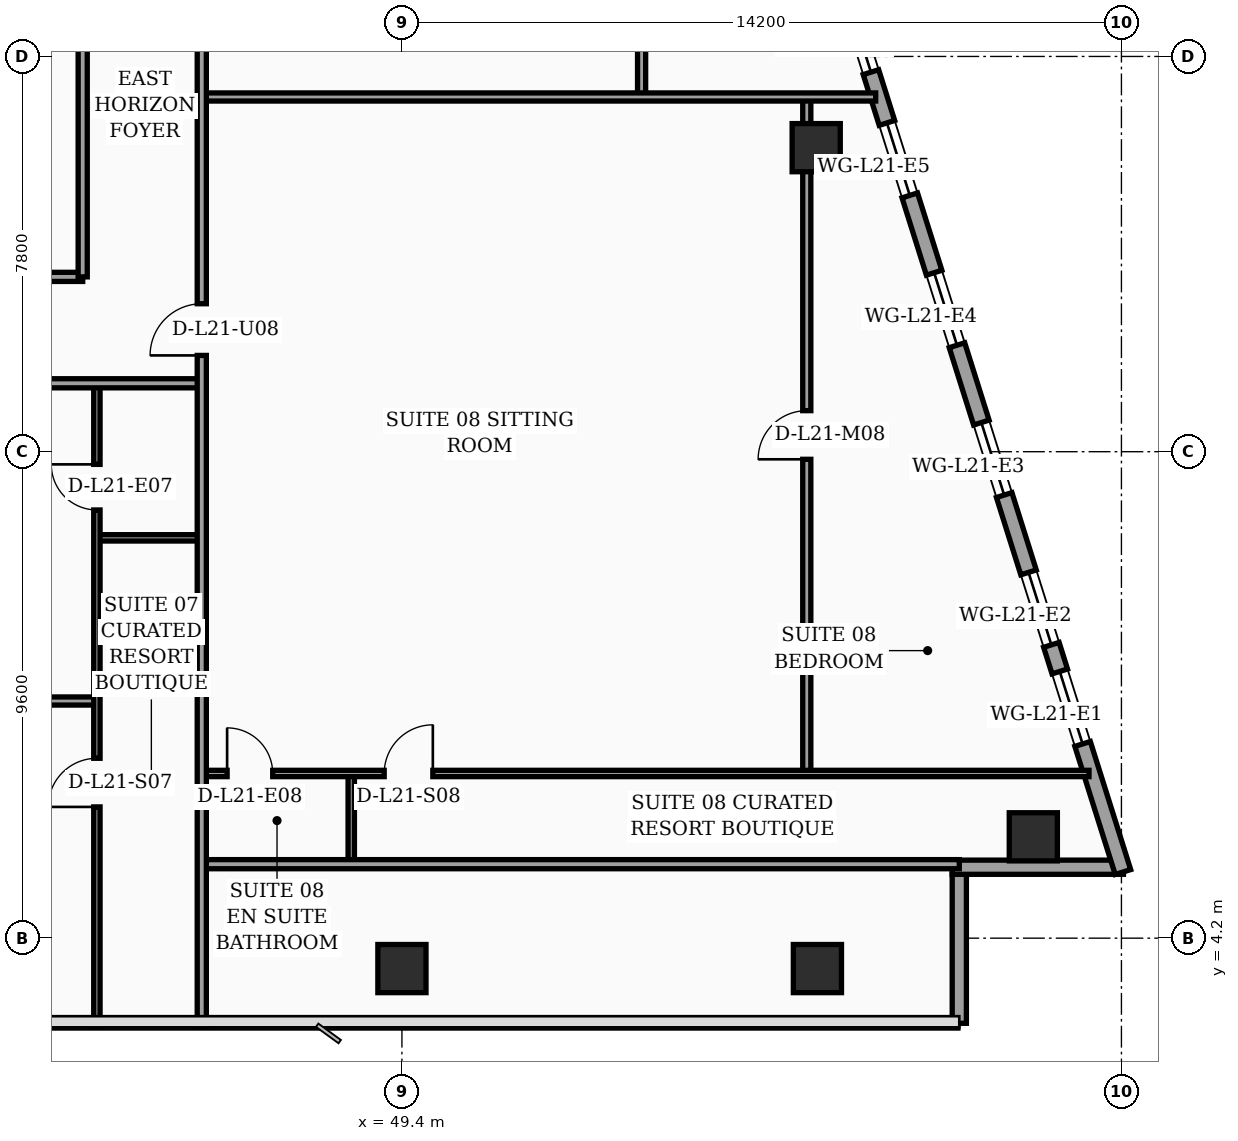
"""IFC4 building model, lengths in metres.
Left out: names, types, materials, properties, quantities, classifications, styles, units other than length and angle.
Written with IfcOpenShell. Run it as: python <this file> out.ifc"""

import sys

from ifc_helpers import new_model, si_unit, direction, frame, frame_2d, origin, origin_2d, place, context, subcontext, project, spatial, rectangle, hollow_rectangle, extrude, element, fill, save


model = new_model("IFC4")
c1 = context("Model", 3, precision=1e-05, world=origin(), true_north=direction((0.0, 1.0)))
c2 = subcontext(c1, "Body", "Model", "MODEL_VIEW")
j1 = project(units=[si_unit("LENGTHUNIT", "METRE"), si_unit("PLANEANGLEUNIT", "RADIAN")], contexts=[c1])
p1 = place(None, origin())
s1 = spatial("IfcSite", under=j1, at=p1, CompositionType="ELEMENT")
p2 = place(p1, origin())
s2 = spatial("IfcBuilding", under=s1, at=p2, CompositionType="ELEMENT")
p3 = place(p2, frame((0.0, 0.0, 88.8)))
s3 = spatial("IfcBuildingStorey", under=s2, at=p3, CompositionType="ELEMENT", Elevation=88.8)
for number, where, z_axis, x_axis in (
    (1, (49.4, 3.6, 0.0), (0.0, 0.0, 1.0), (1.0, 0.0, 0.0)),
    (2, (57.6, 3.6, 0.0), (0.0, 0.0, 1.0), (1.0, 0.0, 0.0)),
    (3, (61.861, 6.2, 0.0), (0.0, 0.0, 1.0), (1.0, 0.0, 0.0)),
    (4, (57.576, 19.8, 0.0), (0.0, 0.0, 1.0), (1.0, 0.0, 0.0)),
):
    element("IfcColumn", number, at=place(p3, frame(where, z_axis=z_axis, x_axis=x_axis)), inside=s3, PredefinedType="COLUMN", context=c2, shape_type="SweptSolid", body=[
        extrude(hollow_rectangle(XDim=0.95, YDim=0.95, WallThickness=0.04, at=origin_2d()), origin(), (0.0, 0.0, 1.0), 3.52),
    ])
p4 = place(p3, frame((60.4, 2.52, 0.0), z_axis=(0.0, 0.0, 1.0), x_axis=(0.0, 1.0, 0.0)))
e5 = element("IfcWall", 5, at=p4, inside=s3, PredefinedType="SOLIDWALL", context=c2, shape_type="SweptSolid", body=[
    extrude(rectangle(XDim=2.94, YDim=0.28, at=frame_2d((1.47, 0.0))), origin(), (0.0, 0.0, 1.0), 3.02),
])
p5 = place(p3, frame((60.26, 5.6, 0.0), z_axis=(0.0, 0.0, 1.0), x_axis=(1.0, 0.0, 0.0)))
e6 = element("IfcWall", 6, at=p5, inside=s3, PredefinedType="SOLIDWALL", context=c2, shape_type="SweptSolid", body=[
    extrude(rectangle(XDim=3.38, YDim=0.28, at=frame_2d((1.69, 0.0))), origin(), (0.0, 0.0, 1.0), 3.02),
])
p6 = place(p3, frame((63.63, 5.505, 0.0), z_axis=(0.0, 0.0, 1.0), x_axis=(-0.300501856448, 0.953781229775, 0.0)))
e7 = element("IfcWall", 7, at=p6, inside=s3, PredefinedType="SOLIDWALL", context=c2, shape_type="SweptSolid", body=[
    extrude(rectangle(XDim=30.814, YDim=0.32, at=frame_2d((15.407, 0.0))), origin(), (0.0, 0.0, 1.0), 3.52),
])
p7 = place(p6, frame((18.796, 0.0, 0.0)))
e8 = element("IfcOpeningElement", 8, at=p7, cuts=e7, PredefinedType="OPENING", context=c2, shape_type="SweptSolid", body=[
    extrude(rectangle(XDim=1.4, YDim=2.25, at=frame_2d((0.7, 1.125))), frame((0.0, 0.17, 0.0), z_axis=(0.0, -1.0, 0.0), x_axis=(1.0, 0.0, 0.0)), (0.0, 0.0, 1.0), 0.34),
])
p8 = place(p6, frame((2.65, 0.0, 0.75)))
e9 = element("IfcOpeningElement", 9, at=p8, cuts=e7, PredefinedType="OPENING", context=c2, shape_type="SweptSolid", body=[
    extrude(rectangle(XDim=1.5, YDim=1.6, at=frame_2d((0.75, 0.8))), frame((0.0, 0.17, 0.0), z_axis=(0.0, -1.0, 0.0), x_axis=(1.0, 0.0, 0.0)), (0.0, 0.0, 1.0), 0.34),
])
p9 = place(p6, frame((4.7, 0.0, 0.75)))
e10 = element("IfcOpeningElement", 10, at=p9, cuts=e7, PredefinedType="OPENING", context=c2, shape_type="SweptSolid", body=[
    extrude(rectangle(XDim=1.5, YDim=1.6, at=frame_2d((0.75, 0.8))), frame((0.0, 0.17, 0.0), z_axis=(0.0, -1.0, 0.0), x_axis=(1.0, 0.0, 0.0)), (0.0, 0.0, 1.0), 0.34),
])
p10 = place(p6, frame((7.8, 0.0, 0.75)))
e11 = element("IfcOpeningElement", 11, at=p10, cuts=e7, PredefinedType="OPENING", context=c2, shape_type="SweptSolid", body=[
    extrude(rectangle(XDim=1.5, YDim=1.6, at=frame_2d((0.75, 0.8))), frame((0.0, 0.17, 0.0), z_axis=(0.0, -1.0, 0.0), x_axis=(1.0, 0.0, 0.0)), (0.0, 0.0, 1.0), 0.34),
])
p11 = place(p6, frame((10.9, 0.0, 0.75)))
e12 = element("IfcOpeningElement", 12, at=p11, cuts=e7, PredefinedType="OPENING", context=c2, shape_type="SweptSolid", body=[
    extrude(rectangle(XDim=1.5, YDim=1.6, at=frame_2d((0.75, 0.8))), frame((0.0, 0.17, 0.0), z_axis=(0.0, -1.0, 0.0), x_axis=(1.0, 0.0, 0.0)), (0.0, 0.0, 1.0), 0.34),
])
p12 = place(p6, frame((14.0, 0.0, 0.75)))
e13 = element("IfcOpeningElement", 13, at=p12, cuts=e7, PredefinedType="OPENING", context=c2, shape_type="SweptSolid", body=[
    extrude(rectangle(XDim=1.5, YDim=1.6, at=frame_2d((0.75, 0.8))), frame((0.0, 0.17, 0.0), z_axis=(0.0, -1.0, 0.0), x_axis=(1.0, 0.0, 0.0)), (0.0, 0.0, 1.0), 0.34),
])
p13 = place(p6, frame((16.55, 0.0, 0.75)))
e14 = element("IfcOpeningElement", 14, at=p13, cuts=e7, PredefinedType="OPENING", context=c2, shape_type="SweptSolid", body=[
    extrude(rectangle(XDim=1.5, YDim=1.6, at=frame_2d((0.75, 0.8))), frame((0.0, 0.17, 0.0), z_axis=(0.0, -1.0, 0.0), x_axis=(1.0, 0.0, 0.0)), (0.0, 0.0, 1.0), 0.34),
])
p14 = place(p6, frame((20.75, 0.0, 0.75)))
e15 = element("IfcOpeningElement", 15, at=p14, cuts=e7, PredefinedType="OPENING", context=c2, shape_type="SweptSolid", body=[
    extrude(rectangle(XDim=1.5, YDim=1.6, at=frame_2d((0.75, 0.8))), frame((0.0, 0.17, 0.0), z_axis=(0.0, -1.0, 0.0), x_axis=(1.0, 0.0, 0.0)), (0.0, 0.0, 1.0), 0.34),
])
p15 = place(p6, frame((26.4, 0.0, 0.75)))
e16 = element("IfcOpeningElement", 16, at=p15, cuts=e7, PredefinedType="OPENING", context=c2, shape_type="SweptSolid", body=[
    extrude(rectangle(XDim=1.5, YDim=1.6, at=frame_2d((0.75, 0.8))), frame((0.0, 0.17, 0.0), z_axis=(0.0, -1.0, 0.0), x_axis=(1.0, 0.0, 0.0)), (0.0, 0.0, 1.0), 0.34),
])
p16 = place(p3, frame((43.38, 12.1, 0.0), z_axis=(0.0, 0.0, 1.0), x_axis=(1.0, 0.0, 0.0)))
e17 = element("IfcWall", 17, at=p16, inside=s3, PredefinedType="PARTITIONING", context=c2, shape_type="SweptSolid", body=[
    extrude(rectangle(XDim=2.07, YDim=0.125, at=frame_2d((1.035, 0.0))), origin(), (0.0, 0.0, 1.0), 3.52),
])
p17 = place(p3, frame((38.17, 8.88, 0.0), z_axis=(0.0, 0.0, 1.0), x_axis=(1.0, 0.0, 0.0)))
e18 = element("IfcWall", 18, at=p17, inside=s3, PredefinedType="PARTITIONING", context=c2, shape_type="SweptSolid", body=[
    extrude(rectangle(XDim=5.21, YDim=0.16, at=frame_2d((2.605, 0.0))), origin(), (0.0, 0.0, 1.0), 3.52),
])
p18 = place(p17, frame((2.13, 0.0, 0.0)))
e19 = element("IfcOpeningElement", 19, at=p18, cuts=e18, PredefinedType="OPENING", context=c2, shape_type="SweptSolid", body=[
    extrude(rectangle(XDim=0.96, YDim=2.2, at=frame_2d((0.48, 1.1))), frame((0.0, 0.09, 0.0), z_axis=(0.0, -1.0, 0.0), x_axis=(1.0, 0.0, 0.0)), (0.0, 0.0, 1.0), 0.18),
])
p19 = place(p3, frame((43.38, 2.44, 0.0), z_axis=(0.0, 0.0, 1.0), x_axis=(0.0, 1.0, 0.0)))
e20 = element("IfcWall", 20, at=p19, inside=s3, PredefinedType="PARTITIONING", context=c2, shape_type="SweptSolid", body=[
    extrude(rectangle(XDim=12.71, YDim=0.125, at=frame_2d((6.355, 0.0))), origin(), (0.0, 0.0, 1.0), 3.02),
])
p20 = place(p19, frame((4.35, 0.0, 0.0)))
e21 = element("IfcOpeningElement", 21, at=p20, cuts=e20, PredefinedType="OPENING", context=c2, shape_type="SweptSolid", body=[
    extrude(rectangle(XDim=0.96, YDim=2.2, at=frame_2d((0.48, 1.1))), frame((0.0, 0.073, 0.0), z_axis=(0.0, -1.0, 0.0), x_axis=(1.0, 0.0, 0.0)), (0.0, 0.0, 1.0), 0.145),
])
p21 = place(p19, frame((10.21, 0.0, 0.0)))
e22 = element("IfcOpeningElement", 22, at=p21, cuts=e20, PredefinedType="OPENING", context=c2, shape_type="SweptSolid", body=[
    extrude(rectangle(XDim=0.9, YDim=2.15, at=frame_2d((0.45, 1.075))), frame((0.0, 0.073, 0.0), z_axis=(0.0, -1.0, 0.0), x_axis=(1.0, 0.0, 0.0)), (0.0, 0.0, 1.0), 0.145),
])
p22 = place(p3, frame((32.4, 15.15, 0.0), z_axis=(0.0, 0.0, 1.0), x_axis=(1.0, 0.0, 0.0)))
e23 = element("IfcWall", 23, at=p22, inside=s3, PredefinedType="PARTITIONING", context=c2, shape_type="SweptSolid", body=[
    extrude(rectangle(XDim=13.05, YDim=0.18, at=frame_2d((6.525, 0.0))), origin(), (0.0, 0.0, 1.0), 2.82),
])
p23 = place(p22, frame((1.51, 0.0, 0.0)))
e24 = element("IfcOpeningElement", 24, at=p23, cuts=e23, PredefinedType="OPENING", context=c2, shape_type="SweptSolid", body=[
    extrude(rectangle(XDim=1.02, YDim=2.2, at=frame_2d((0.51, 1.1))), frame((0.0, 0.1, 0.0), z_axis=(0.0, -1.0, 0.0), x_axis=(1.0, 0.0, 0.0)), (0.0, 0.0, 1.0), 0.2),
])
p24 = place(p22, frame((7.87, 0.0, 0.0)))
e25 = element("IfcOpeningElement", 25, at=p24, cuts=e23, PredefinedType="OPENING", context=c2, shape_type="SweptSolid", body=[
    extrude(rectangle(XDim=1.02, YDim=2.2, at=frame_2d((0.51, 1.1))), frame((0.0, 0.1, 0.0), z_axis=(0.0, -1.0, 0.0), x_axis=(1.0, 0.0, 0.0)), (0.0, 0.0, 1.0), 0.2),
])
p25 = place(p3, frame((21.5, 17.25, 0.0), z_axis=(0.0, 0.0, 1.0), x_axis=(1.0, 0.0, 0.0)))
e26 = element("IfcWall", 26, at=p25, inside=s3, PredefinedType="PARTITIONING", context=c2, shape_type="SweptSolid", body=[
    extrude(rectangle(XDim=21.6, YDim=0.18, at=frame_2d((10.8, 0.0))), origin(), (0.0, 0.0, 1.0), 2.82),
])
p26 = place(p25, frame((0.95, 0.0, 0.0)))
e27 = element("IfcOpeningElement", 27, at=p26, cuts=e26, PredefinedType="OPENING", context=c2, shape_type="SweptSolid", body=[
    extrude(rectangle(XDim=1.02, YDim=2.2, at=frame_2d((0.51, 1.1))), frame((0.0, 0.1, 0.0), z_axis=(0.0, -1.0, 0.0), x_axis=(1.0, 0.0, 0.0)), (0.0, 0.0, 1.0), 0.2),
])
p27 = place(p25, frame((11.7, 0.0, 0.0)))
e28 = element("IfcOpeningElement", 28, at=p27, cuts=e26, PredefinedType="OPENING", context=c2, shape_type="SweptSolid", body=[
    extrude(rectangle(XDim=1.02, YDim=2.2, at=frame_2d((0.51, 1.1))), frame((0.0, 0.1, 0.0), z_axis=(0.0, -1.0, 0.0), x_axis=(1.0, 0.0, 0.0)), (0.0, 0.0, 1.0), 0.2),
])
p28 = place(p3, frame((43.1, 17.25, 0.0), z_axis=(0.0, 0.0, 1.0), x_axis=(0.0, 1.0, 0.0)))
e29 = element("IfcWall", 29, at=p28, inside=s3, PredefinedType="PARTITIONING", context=c2, shape_type="SweptSolid", body=[
    extrude(rectangle(XDim=17.38, YDim=0.18, at=frame_2d((8.69, 0.0))), origin(), (0.0, 0.0, 1.0), 2.82),
])
p29 = place(p3, frame((48.4, 5.66, 0.0), z_axis=(0.0, 0.0, 1.0), x_axis=(0.0, 1.0, 0.0)))
e30 = element("IfcWall", 30, at=p29, inside=s3, PredefinedType="PARTITIONING", context=c2, shape_type="SweptSolid", body=[
    extrude(rectangle(XDim=1.79, YDim=0.125, at=frame_2d((0.895, 0.0))), origin(), (0.0, 0.0, 1.0), 2.82),
])
p30 = place(p3, frame((57.39, 7.45, 0.0), z_axis=(0.0, 0.0, 1.0), x_axis=(0.0, 1.0, 0.0)))
e31 = element("IfcWall", 31, at=p30, inside=s3, PredefinedType="PARTITIONING", context=c2, shape_type="SweptSolid", body=[
    extrude(rectangle(XDim=13.35, YDim=0.16, at=frame_2d((6.675, 0.0))), origin(), (0.0, 0.0, 1.0), 2.82),
])
p31 = place(p30, frame((6.2, 0.0, 0.0)))
e32 = element("IfcOpeningElement", 32, at=p31, cuts=e31, PredefinedType="OPENING", context=c2, shape_type="SweptSolid", body=[
    extrude(rectangle(XDim=0.96, YDim=2.2, at=frame_2d((0.48, 1.1))), frame((0.0, 0.09, 0.0), z_axis=(0.0, -1.0, 0.0), x_axis=(1.0, 0.0, 0.0)), (0.0, 0.0, 1.0), 0.18),
])
p32 = place(p3, frame((45.45, 7.45, 0.0), z_axis=(0.0, 0.0, 1.0), x_axis=(1.0, 0.0, 0.0)))
e33 = element("IfcWall", 33, at=p32, inside=s3, PredefinedType="PARTITIONING", context=c2, shape_type="SweptSolid", body=[
    extrude(rectangle(XDim=17.51, YDim=0.125, at=frame_2d((8.755, 0.0))), origin(), (0.0, 0.0, 1.0), 2.82),
])
p33 = place(p32, frame((0.5, 0.0, 0.0)))
e34 = element("IfcOpeningElement", 34, at=p33, cuts=e33, PredefinedType="OPENING", context=c2, shape_type="SweptSolid", body=[
    extrude(rectangle(XDim=0.9, YDim=2.15, at=frame_2d((0.45, 1.075))), frame((0.0, 0.073, 0.0), z_axis=(0.0, -1.0, 0.0), x_axis=(1.0, 0.0, 0.0)), (0.0, 0.0, 1.0), 0.145),
])
p34 = place(p32, frame((3.6, 0.0, 0.0)))
e35 = element("IfcOpeningElement", 35, at=p34, cuts=e33, PredefinedType="OPENING", context=c2, shape_type="SweptSolid", body=[
    extrude(rectangle(XDim=0.96, YDim=2.2, at=frame_2d((0.48, 1.1))), frame((0.0, 0.073, 0.0), z_axis=(0.0, -1.0, 0.0), x_axis=(1.0, 0.0, 0.0)), (0.0, 0.0, 1.0), 0.145),
])
p35 = place(p3, frame((45.45, 5.66, 0.0), z_axis=(0.0, 0.0, 1.0), x_axis=(1.0, 0.0, 0.0)))
e36 = element("IfcWall", 36, at=p35, inside=s3, PredefinedType="PARTITIONING", context=c2, shape_type="SweptSolid", body=[
    extrude(rectangle(XDim=14.95, YDim=0.18, at=frame_2d((7.475, 0.0))), origin(), (0.0, 0.0, 1.0), 2.82),
])
p36 = place(p3, frame((54.13, 20.8, 0.0), z_axis=(0.0, 0.0, 1.0), x_axis=(0.0, 1.0, 0.0)))
e37 = element("IfcWall", 37, at=p36, inside=s3, PredefinedType="PARTITIONING", context=c2, shape_type="SweptSolid", body=[
    extrude(rectangle(XDim=7.35, YDim=0.16, at=frame_2d((3.675, 0.0))), origin(), (0.0, 0.0, 1.0), 3.17),
])
p37 = place(p36, frame((3.19, 0.0, 0.0)))
e38 = element("IfcOpeningElement", 38, at=p37, cuts=e37, PredefinedType="OPENING", context=c2, shape_type="SweptSolid", body=[
    extrude(rectangle(XDim=0.96, YDim=2.2, at=frame_2d((0.48, 1.1))), frame((0.0, 0.09, 0.0), z_axis=(0.0, -1.0, 0.0), x_axis=(1.0, 0.0, 0.0)), (0.0, 0.0, 1.0), 0.18),
])
p38 = place(p3, frame((45.45, 20.8, 0.0), z_axis=(0.0, 0.0, 1.0), x_axis=(1.0, 0.0, 0.0)))
e39 = element("IfcWall", 39, at=p38, inside=s3, PredefinedType="PARTITIONING", context=c2, shape_type="SweptSolid", body=[
    extrude(rectangle(XDim=13.3, YDim=0.16, at=frame_2d((6.65, 0.0))), origin(), (0.0, 0.0, 1.0), 2.82),
])
p39 = place(p3, frame((45.45, 2.44, 0.0), z_axis=(0.0, 0.0, 1.0), x_axis=(0.0, 1.0, 0.0)))
e40 = element("IfcWall", 40, at=p39, inside=s3, PredefinedType="PARTITIONING", context=c2, shape_type="SweptSolid", body=[
    extrude(rectangle(XDim=27.84, YDim=0.18, at=frame_2d((13.92, 0.0))), origin(), (0.0, 0.0, 1.0), 2.82),
])
p40 = place(p39, frame((13.26, 0.0, 0.0)))
e41 = element("IfcOpeningElement", 41, at=p40, cuts=e40, PredefinedType="OPENING", context=c2, shape_type="SweptSolid", body=[
    extrude(rectangle(XDim=1.02, YDim=2.2, at=frame_2d((0.51, 1.1))), frame((0.0, 0.1, 0.0), z_axis=(0.0, -1.0, 0.0), x_axis=(1.0, 0.0, 0.0)), (0.0, 0.0, 1.0), 0.2),
])
p41 = place(p39, frame((21.52, 0.0, 0.0)))
e42 = element("IfcOpeningElement", 42, at=p41, cuts=e40, PredefinedType="OPENING", context=c2, shape_type="SweptSolid", body=[
    extrude(rectangle(XDim=1.02, YDim=2.2, at=frame_2d((0.51, 1.1))), frame((0.0, 0.1, 0.0), z_axis=(0.0, -1.0, 0.0), x_axis=(1.0, 0.0, 0.0)), (0.0, 0.0, 1.0), 0.2),
])
p42 = place(p8, origin())
e43 = element("IfcWindow", 43, at=p42, inside=s3, PartitioningType="SINGLE_PANEL", PredefinedType="WINDOW", context=c2, shape_type="SweptSolid", body=[
    extrude(rectangle(XDim=1.5, YDim=1.6, at=frame_2d((0.75, 0.8))), frame((0.0, 0.03, 0.0), z_axis=(0.0, -1.0, 0.0), x_axis=(1.0, 0.0, 0.0)), (0.0, 0.0, 1.0), 0.06),
])
fill(e9, e43)
p43 = place(p9, origin())
e44 = element("IfcWindow", 44, at=p43, inside=s3, PartitioningType="SINGLE_PANEL", PredefinedType="WINDOW", context=c2, shape_type="SweptSolid", body=[
    extrude(rectangle(XDim=1.5, YDim=1.6, at=frame_2d((0.75, 0.8))), frame((0.0, 0.03, 0.0), z_axis=(0.0, -1.0, 0.0), x_axis=(1.0, 0.0, 0.0)), (0.0, 0.0, 1.0), 0.06),
])
fill(e10, e44)
p44 = place(p10, origin())
e45 = element("IfcWindow", 45, at=p44, inside=s3, PartitioningType="SINGLE_PANEL", PredefinedType="WINDOW", context=c2, shape_type="SweptSolid", body=[
    extrude(rectangle(XDim=1.5, YDim=1.6, at=frame_2d((0.75, 0.8))), frame((0.0, 0.03, 0.0), z_axis=(0.0, -1.0, 0.0), x_axis=(1.0, 0.0, 0.0)), (0.0, 0.0, 1.0), 0.06),
])
fill(e11, e45)
p45 = place(p11, origin())
e46 = element("IfcWindow", 46, at=p45, inside=s3, PartitioningType="SINGLE_PANEL", PredefinedType="WINDOW", context=c2, shape_type="SweptSolid", body=[
    extrude(rectangle(XDim=1.5, YDim=1.6, at=frame_2d((0.75, 0.8))), frame((0.0, 0.03, 0.0), z_axis=(0.0, -1.0, 0.0), x_axis=(1.0, 0.0, 0.0)), (0.0, 0.0, 1.0), 0.06),
])
fill(e12, e46)
p46 = place(p12, origin())
e47 = element("IfcWindow", 47, at=p46, inside=s3, PartitioningType="SINGLE_PANEL", PredefinedType="WINDOW", context=c2, shape_type="SweptSolid", body=[
    extrude(rectangle(XDim=1.5, YDim=1.6, at=frame_2d((0.75, 0.8))), frame((0.0, 0.03, 0.0), z_axis=(0.0, -1.0, 0.0), x_axis=(1.0, 0.0, 0.0)), (0.0, 0.0, 1.0), 0.06),
])
fill(e13, e47)
p47 = place(p13, origin())
e48 = element("IfcWindow", 48, at=p47, inside=s3, PartitioningType="SINGLE_PANEL", PredefinedType="WINDOW", context=c2, shape_type="SweptSolid", body=[
    extrude(rectangle(XDim=1.5, YDim=1.6, at=frame_2d((0.75, 0.8))), frame((0.0, 0.03, 0.0), z_axis=(0.0, -1.0, 0.0), x_axis=(1.0, 0.0, 0.0)), (0.0, 0.0, 1.0), 0.06),
])
fill(e14, e48)
p48 = place(p20, origin())
e49 = element("IfcDoor", 49, at=p48, inside=s3, OperationType="SINGLE_SWING_LEFT", PredefinedType="DOOR", context=c2, shape_type="SweptSolid", body=[
    extrude(rectangle(XDim=0.96, YDim=2.2, at=frame_2d((0.48, 1.1))), frame((0.0, 0.025, 0.0), z_axis=(0.0, -1.0, 0.0), x_axis=(1.0, 0.0, 0.0)), (0.0, 0.0, 1.0), 0.05),
])
fill(e21, e49)
p49 = place(p21, origin())
e50 = element("IfcDoor", 50, at=p49, inside=s3, OperationType="SINGLE_SWING_RIGHT", PredefinedType="DOOR", context=c2, shape_type="SweptSolid", body=[
    extrude(rectangle(XDim=0.9, YDim=2.15, at=frame_2d((0.45, 1.075))), frame((0.0, 0.025, 0.0), z_axis=(0.0, -1.0, 0.0), x_axis=(1.0, 0.0, 0.0)), (0.0, 0.0, 1.0), 0.05),
])
fill(e22, e50)
p50 = place(p31, origin())
e51 = element("IfcDoor", 51, at=p50, inside=s3, OperationType="SINGLE_SWING_LEFT", PredefinedType="DOOR", context=c2, shape_type="SweptSolid", body=[
    extrude(rectangle(XDim=0.96, YDim=2.2, at=frame_2d((0.48, 1.1))), frame((0.0, 0.025, 0.0), z_axis=(0.0, -1.0, 0.0), x_axis=(1.0, 0.0, 0.0)), (0.0, 0.0, 1.0), 0.05),
])
fill(e32, e51)
p51 = place(p33, origin())
e52 = element("IfcDoor", 52, at=p51, inside=s3, OperationType="SINGLE_SWING_LEFT", PredefinedType="DOOR", context=c2, shape_type="SweptSolid", body=[
    extrude(rectangle(XDim=0.9, YDim=2.15, at=frame_2d((0.45, 1.075))), frame((0.0, 0.025, 0.0), z_axis=(0.0, -1.0, 0.0), x_axis=(1.0, 0.0, 0.0)), (0.0, 0.0, 1.0), 0.05),
])
fill(e34, e52)
p52 = place(p34, origin())
e53 = element("IfcDoor", 53, at=p52, inside=s3, OperationType="SINGLE_SWING_RIGHT", PredefinedType="DOOR", context=c2, shape_type="SweptSolid", body=[
    extrude(rectangle(XDim=0.96, YDim=2.2, at=frame_2d((0.48, 1.1))), frame((0.0, 0.025, 0.0), z_axis=(0.0, -1.0, 0.0), x_axis=(1.0, 0.0, 0.0)), (0.0, 0.0, 1.0), 0.05),
])
fill(e35, e53)
p53 = place(p40, origin())
e54 = element("IfcDoor", 54, at=p53, inside=s3, OperationType="SINGLE_SWING_LEFT", PredefinedType="DOOR", context=c2, shape_type="SweptSolid", body=[
    extrude(rectangle(XDim=1.02, YDim=2.2, at=frame_2d((0.51, 1.1))), frame((0.0, 0.025, 0.0), z_axis=(0.0, -1.0, 0.0), x_axis=(1.0, 0.0, 0.0)), (0.0, 0.0, 1.0), 0.05),
])
fill(e41, e54)
save(model, sys.argv[1])
